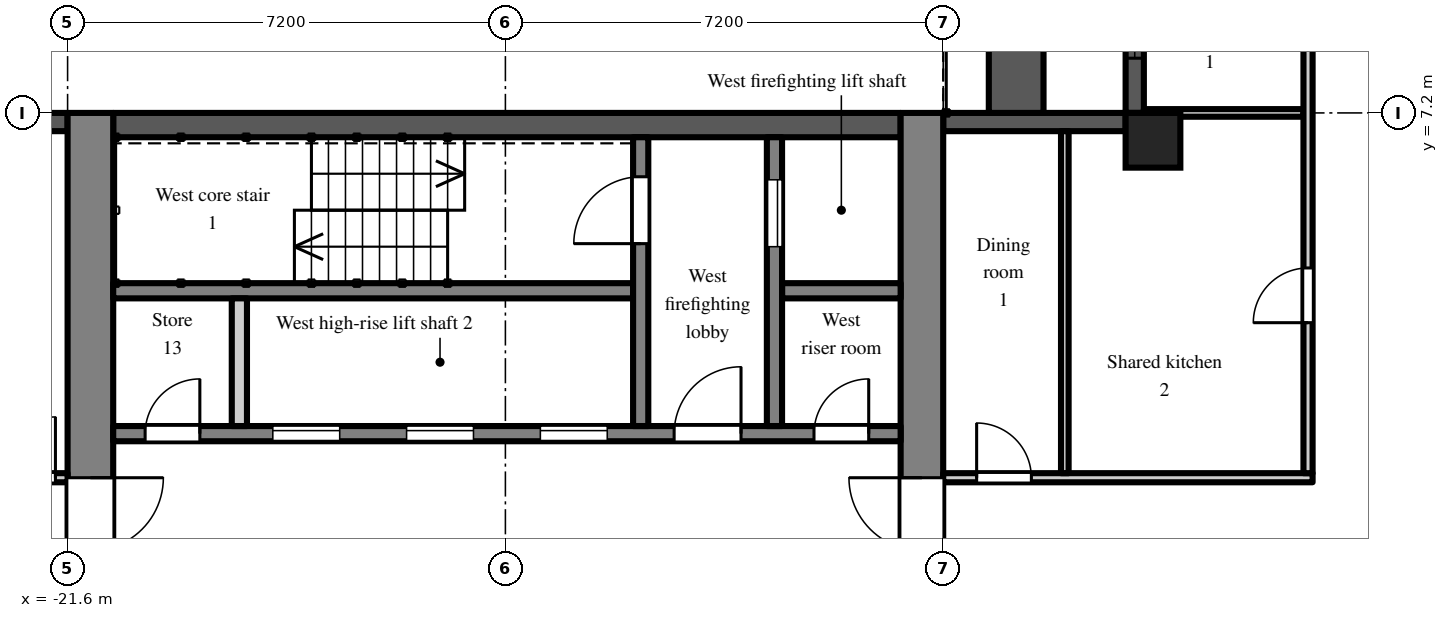
"""IFC4 building model, lengths in metres.
Left out: names, types, materials, properties, quantities, classifications, styles, units other than length and angle.
Written with IfcOpenShell. Run it as: python <this file> out.ifc"""

import sys

from ifc_helpers import new_model, si_unit, direction, frame, frame_2d, origin, origin_2d, place, context, subcontext, project, spatial, rectangle, extrude, element, fill, save


model = new_model("IFC4")
c1 = context("Model", 3, precision=1e-05, world=origin(), true_north=direction((0.0, 1.0)))
c2 = subcontext(c1, "Body", "Model", "MODEL_VIEW")
j1 = project(units=[si_unit("LENGTHUNIT", "METRE"), si_unit("PLANEANGLEUNIT", "RADIAN")], contexts=[c1])
p1 = place(None, origin())
s1 = spatial("IfcSite", under=j1, at=p1, CompositionType="ELEMENT")
p2 = place(p1, origin())
s2 = spatial("IfcBuilding", under=s1, at=p2, CompositionType="ELEMENT")
p3 = place(p2, frame((0.0, 0.0, 216.9)))
s3 = spatial("IfcBuildingStorey", under=s2, at=p3, CompositionType="ELEMENT", Elevation=216.9)
p4 = place(p3, frame((-3.75, 6.75, 0.0), z_axis=(0.0, 0.0, 1.0), x_axis=(1.0, 0.0, 0.0)))
e1 = element("IfcColumn", 1, at=p4, inside=s3, PredefinedType="COLUMN", context=c2, shape_type="SweptSolid", body=[
    extrude(rectangle(XDim=0.9, YDim=0.9, at=origin_2d()), origin(), (0.0, 0.0, 1.0), 3.0),
])
p5 = place(p3, frame((-4.05, 14.4, 0.0), z_axis=(0.0, 0.0, 1.0), x_axis=(0.0, -1.0, 0.0)))
e2 = element("IfcWall", 2, at=p5, inside=s3, PredefinedType="SOLIDWALL", context=c2, shape_type="SweptSolid", body=[
    extrude(rectangle(XDim=7.2, YDim=0.3, at=frame_2d((3.6, 0.0))), origin(), (0.0, 0.0, 1.0), 2.3),
])
p6 = place(p5, frame((3.0, 0.0, 0.0)))
e3 = element("IfcOpeningElement", 3, at=p6, cuts=e2, PredefinedType="OPENING", context=c2, shape_type="SweptSolid", body=[
    extrude(rectangle(XDim=1.2, YDim=2.05, at=frame_2d((0.6, 1.025))), frame((0.0, 0.16, 0.0), z_axis=(0.0, -1.0, 0.0), x_axis=(1.0, 0.0, 0.0)), (0.0, 0.0, 1.0), 0.32),
])
p7 = place(p5, frame((0.9, 0.0, 0.2)))
e4 = element("IfcOpeningElement", 4, at=p7, cuts=e2, PredefinedType="OPENING", context=c2, shape_type="SweptSolid", body=[
    extrude(rectangle(XDim=1.8, YDim=1.85, at=frame_2d((0.9, 0.925))), frame((0.0, 0.16, 0.0), z_axis=(0.0, -1.0, 0.0), x_axis=(1.0, 0.0, 0.0)), (0.0, 0.0, 1.0), 0.32),
])
p8 = place(p5, frame((4.5, 0.0, 0.2)))
e5 = element("IfcOpeningElement", 5, at=p8, cuts=e2, PredefinedType="OPENING", context=c2, shape_type="SweptSolid", body=[
    extrude(rectangle(XDim=1.8, YDim=1.85, at=frame_2d((0.9, 0.925))), frame((0.0, 0.16, 0.0), z_axis=(0.0, -1.0, 0.0), x_axis=(1.0, 0.0, 0.0)), (0.0, 0.0, 1.0), 0.32),
])
p9 = place(p3, frame((-4.2, 7.05, 0.0), z_axis=(0.0, 0.0, 1.0), x_axis=(-1.0, 0.0, 0.0)))
e6 = element("IfcWall", 6, at=p9, inside=s3, PredefinedType="SOLIDWALL", context=c2, shape_type="SweptSolid", body=[
    extrude(rectangle(XDim=3.0, YDim=0.3, at=frame_2d((1.5, 0.0))), origin(), (0.0, 0.0, 1.0), 2.3),
])
p10 = place(p3, frame((-21.6, 7.05, 0.0), z_axis=(0.0, 0.0, 1.0), x_axis=(-1.0, 0.0, 0.0)))
e7 = element("IfcWall", 7, at=p10, inside=s3, PredefinedType="SOLIDWALL", context=c2, shape_type="SweptSolid", body=[
    extrude(rectangle(XDim=2.7, YDim=0.3, at=frame_2d((1.35, 0.0))), origin(), (0.0, 0.0, 1.0), 2.3),
])
p11 = place(p10, frame((0.75, 0.0, 0.2)))
e8 = element("IfcOpeningElement", 8, at=p11, cuts=e7, PredefinedType="OPENING", context=c2, shape_type="SweptSolid", body=[
    extrude(rectangle(XDim=1.2, YDim=1.85, at=frame_2d((0.6, 0.925))), frame((0.0, 0.16, 0.0), z_axis=(0.0, -1.0, 0.0), x_axis=(1.0, 0.0, 0.0)), (0.0, 0.0, 1.0), 0.32),
])
p12 = place(p3, frame((-6.0, 7.2, 0.0), z_axis=(0.0, 0.0, 1.0), x_axis=(0.0, 1.0, 0.0)))
e9 = element("IfcWall", 9, at=p12, inside=s3, PredefinedType="PARAPET", context=c2, shape_type="SweptSolid", body=[
    extrude(rectangle(XDim=7.2, YDim=0.9, at=frame_2d((3.6, 0.0))), origin(), (0.0, 0.0, 1.0), 0.8),
])
p13 = place(p3, frame((-7.55, -7.2, 0.0), z_axis=(0.0, 0.0, 1.0), x_axis=(0.0, 1.0, 0.0)))
e10 = element("IfcWall", 10, at=p13, inside=s3, PredefinedType="SHEAR", context=c2, shape_type="SweptSolid", body=[
    extrude(rectangle(XDim=14.4, YDim=0.7, at=frame_2d((7.2, 0.0))), origin(), (0.0, 0.0, 1.0), 2.6),
])
p14 = place(p13, frame((6.0, 0.0, 0.0)))
e11 = element("IfcOpeningElement", 11, at=p14, cuts=e10, PredefinedType="OPENING", context=c2, shape_type="SweptSolid", body=[
    extrude(rectangle(XDim=2.4, YDim=2.2, at=frame_2d((1.2, 1.1))), frame((0.0, 0.36, 0.0), z_axis=(0.0, -1.0, 0.0), x_axis=(1.0, 0.0, 0.0)), (0.0, 0.0, 1.0), 0.72),
])
p15 = place(p3, frame((-21.225, -7.2, 0.0), z_axis=(0.0, 0.0, 1.0), x_axis=(0.0, 1.0, 0.0)))
e12 = element("IfcWall", 12, at=p15, inside=s3, PredefinedType="SHEAR", context=c2, shape_type="SweptSolid", body=[
    extrude(rectangle(XDim=14.4, YDim=0.75, at=frame_2d((7.2, 0.0))), origin(), (0.0, 0.0, 1.0), 2.6),
])
p16 = place(p15, frame((6.0, 0.0, 0.0)))
e13 = element("IfcOpeningElement", 13, at=p16, cuts=e12, PredefinedType="OPENING", context=c2, shape_type="SweptSolid", body=[
    extrude(rectangle(XDim=2.4, YDim=2.2, at=frame_2d((1.2, 1.1))), frame((0.0, 0.385, 0.0), z_axis=(0.0, -1.0, 0.0), x_axis=(1.0, 0.0, 0.0)), (0.0, 0.0, 1.0), 0.77),
])
p17 = place(p3, frame((-7.9, 7.0, 0.0), z_axis=(0.0, 0.0, 1.0), x_axis=(-1.0, 0.0, 0.0)))
e14 = element("IfcWall", 14, at=p17, inside=s3, PredefinedType="SHEAR", context=c2, shape_type="SweptSolid", body=[
    extrude(rectangle(XDim=12.95, YDim=0.4, at=frame_2d((6.475, 0.0))), origin(), (0.0, 0.0, 1.0), 2.6),
])
p18 = place(p3, frame((-7.9, 1.925, 0.0), z_axis=(0.0, 0.0, 1.0), x_axis=(-1.0, 0.0, 0.0)))
e15 = element("IfcWall", 15, at=p18, inside=s3, PredefinedType="SHEAR", context=c2, shape_type="SweptSolid", body=[
    extrude(rectangle(XDim=12.95, YDim=0.25, at=frame_2d((6.475, 0.0))), origin(), (0.0, 0.0, 1.0), 2.6),
])
p19 = place(p18, frame((4.825, 0.0, 0.0)))
e16 = element("IfcOpeningElement", 16, at=p19, cuts=e15, PredefinedType="OPENING", context=c2, shape_type="SweptSolid", body=[
    extrude(rectangle(XDim=1.1, YDim=2.1, at=frame_2d((0.55, 1.05))), frame((0.0, 0.135, 0.0), z_axis=(0.0, -1.0, 0.0), x_axis=(1.0, 0.0, 0.0)), (0.0, 0.0, 1.0), 0.27),
])
p20 = place(p18, frame((7.025, 0.0, 0.0)))
e17 = element("IfcOpeningElement", 17, at=p20, cuts=e15, PredefinedType="OPENING", context=c2, shape_type="SweptSolid", body=[
    extrude(rectangle(XDim=1.1, YDim=2.1, at=frame_2d((0.55, 1.05))), frame((0.0, 0.135, 0.0), z_axis=(0.0, -1.0, 0.0), x_axis=(1.0, 0.0, 0.0)), (0.0, 0.0, 1.0), 0.27),
])
p21 = place(p18, frame((9.225, 0.0, 0.0)))
e18 = element("IfcOpeningElement", 18, at=p21, cuts=e15, PredefinedType="OPENING", context=c2, shape_type="SweptSolid", body=[
    extrude(rectangle(XDim=1.1, YDim=2.1, at=frame_2d((0.55, 1.05))), frame((0.0, 0.135, 0.0), z_axis=(0.0, -1.0, 0.0), x_axis=(1.0, 0.0, 0.0)), (0.0, 0.0, 1.0), 0.27),
])
p22 = place(p18, frame((0.525, 0.0, 0.0)))
e19 = element("IfcOpeningElement", 19, at=p22, cuts=e15, PredefinedType="OPENING", context=c2, shape_type="SweptSolid", body=[
    extrude(rectangle(XDim=0.9, YDim=2.1, at=frame_2d((0.45, 1.05))), frame((0.0, 0.135, 0.0), z_axis=(0.0, -1.0, 0.0), x_axis=(1.0, 0.0, 0.0)), (0.0, 0.0, 1.0), 0.27),
])
p23 = place(p18, frame((2.625, 0.0, 0.0)))
e20 = element("IfcOpeningElement", 20, at=p23, cuts=e15, PredefinedType="OPENING", context=c2, shape_type="SweptSolid", body=[
    extrude(rectangle(XDim=1.1, YDim=2.1, at=frame_2d((0.55, 1.05))), frame((0.0, 0.135, 0.0), z_axis=(0.0, -1.0, 0.0), x_axis=(1.0, 0.0, 0.0)), (0.0, 0.0, 1.0), 0.27),
])
p24 = place(p18, frame((11.525, 0.0, 0.0)))
e21 = element("IfcOpeningElement", 21, at=p24, cuts=e15, PredefinedType="OPENING", context=c2, shape_type="SweptSolid", body=[
    extrude(rectangle(XDim=0.9, YDim=2.1, at=frame_2d((0.45, 1.05))), frame((0.0, 0.135, 0.0), z_axis=(0.0, -1.0, 0.0), x_axis=(1.0, 0.0, 0.0)), (0.0, 0.0, 1.0), 0.27),
])
p25 = place(p3, frame((-7.9, 4.275, 0.0), z_axis=(0.0, 0.0, 1.0), x_axis=(-1.0, 0.0, 0.0)))
e22 = element("IfcWall", 22, at=p25, inside=s3, PredefinedType="SHEAR", context=c2, shape_type="SweptSolid", body=[
    extrude(rectangle(XDim=1.95, YDim=0.25, at=frame_2d((0.975, 0.0))), origin(), (0.0, 0.0, 1.0), 2.6),
])
p26 = place(p3, frame((-12.3, 4.275, 0.0), z_axis=(0.0, 0.0, 1.0), x_axis=(-1.0, 0.0, 0.0)))
e23 = element("IfcWall", 23, at=p26, inside=s3, PredefinedType="SHEAR", context=c2, shape_type="SweptSolid", body=[
    extrude(rectangle(XDim=8.55, YDim=0.25, at=frame_2d((4.275, 0.0))), origin(), (0.0, 0.0, 1.0), 2.6),
])
p27 = place(p3, frame((-9.975, 2.05, 0.0), z_axis=(0.0, 0.0, 1.0), x_axis=(0.0, 1.0, 0.0)))
e24 = element("IfcWall", 24, at=p27, inside=s3, PredefinedType="SHEAR", context=c2, shape_type="SweptSolid", body=[
    extrude(rectangle(XDim=4.75, YDim=0.25, at=frame_2d((2.375, 0.0))), origin(), (0.0, 0.0, 1.0), 2.6),
])
p28 = place(p27, frame((2.95, 0.0, 0.0)))
e25 = element("IfcOpeningElement", 25, at=p28, cuts=e24, PredefinedType="OPENING", context=c2, shape_type="SweptSolid", body=[
    extrude(rectangle(XDim=1.1, YDim=2.1, at=frame_2d((0.55, 1.05))), frame((0.0, 0.135, 0.0), z_axis=(0.0, -1.0, 0.0), x_axis=(1.0, 0.0, 0.0)), (0.0, 0.0, 1.0), 0.27),
])
p29 = place(p3, frame((-12.175, 2.05, 0.0), z_axis=(0.0, 0.0, 1.0), x_axis=(0.0, 1.0, 0.0)))
e26 = element("IfcWall", 26, at=p29, inside=s3, PredefinedType="SHEAR", context=c2, shape_type="SweptSolid", body=[
    extrude(rectangle(XDim=4.75, YDim=0.25, at=frame_2d((2.375, 0.0))), origin(), (0.0, 0.0, 1.0), 2.6),
])
p30 = place(p29, frame((3.0, 0.0, 0.0)))
e27 = element("IfcOpeningElement", 27, at=p30, cuts=e26, PredefinedType="OPENING", context=c2, shape_type="SweptSolid", body=[
    extrude(rectangle(XDim=1.1, YDim=2.1, at=frame_2d((0.55, 1.05))), frame((0.0, 0.135, 0.0), z_axis=(0.0, -1.0, 0.0), x_axis=(1.0, 0.0, 0.0)), (0.0, 0.0, 1.0), 0.27),
])
p31 = place(p3, frame((-18.775, 2.05, 0.0), z_axis=(0.0, 0.0, 1.0), x_axis=(0.0, 1.0, 0.0)))
e28 = element("IfcWall", 28, at=p31, inside=s3, PredefinedType="PARTITIONING", context=c2, shape_type="SweptSolid", body=[
    extrude(rectangle(XDim=2.1, YDim=0.25, at=frame_2d((1.05, 0.0))), origin(), (0.0, 0.0, 1.0), 2.6),
])
p32 = place(p3, frame((-26.725, 1.2, 0.0), z_axis=(0.0, 0.0, 1.0), x_axis=(1.0, 0.0, 0.0)))
e29 = element("IfcWall", 29, at=p32, inside=s3, PredefinedType="PARTITIONING", context=c2, shape_type="SweptSolid", body=[
    extrude(rectangle(XDim=5.125, YDim=0.15, at=frame_2d((2.562, 0.0))), origin(), (0.0, 0.0, 1.0), 2.6),
])
p33 = place(p32, frame((3.925, 0.0, 0.0)))
e30 = element("IfcOpeningElement", 30, at=p33, cuts=e29, PredefinedType="OPENING", context=c2, shape_type="SweptSolid", body=[
    extrude(rectangle(XDim=1.0, YDim=2.1, at=frame_2d((0.5, 1.05))), frame((0.0, 0.085, 0.0), z_axis=(0.0, -1.0, 0.0), x_axis=(1.0, 0.0, 0.0)), (0.0, 0.0, 1.0), 0.17),
])
p34 = place(p3, frame((-7.2, 1.2, 0.0), z_axis=(0.0, 0.0, 1.0), x_axis=(1.0, 0.0, 0.0)))
e31 = element("IfcWall", 31, at=p34, inside=s3, PredefinedType="PARTITIONING", context=c2, shape_type="SweptSolid", body=[
    extrude(rectangle(XDim=6.075, YDim=0.15, at=frame_2d((3.038, 0.0))), origin(), (0.0, 0.0, 1.0), 2.6),
])
p35 = place(p34, frame((0.55, 0.0, 0.0)))
e32 = element("IfcOpeningElement", 32, at=p35, cuts=e31, PredefinedType="OPENING", context=c2, shape_type="SweptSolid", body=[
    extrude(rectangle(XDim=0.9, YDim=2.1, at=frame_2d((0.45, 1.05))), frame((0.0, 0.085, 0.0), z_axis=(0.0, -1.0, 0.0), x_axis=(1.0, 0.0, 0.0)), (0.0, 0.0, 1.0), 0.17),
])
p36 = place(p3, frame((-5.2, 1.275, 0.0), z_axis=(0.0, 0.0, 1.0), x_axis=(0.0, 1.0, 0.0)))
e33 = element("IfcWall", 33, at=p36, inside=s3, PredefinedType="PARTITIONING", context=c2, shape_type="SweptSolid", body=[
    extrude(rectangle(XDim=5.625, YDim=0.125, at=frame_2d((2.812, 0.0))), origin(), (0.0, 0.0, 1.0), 2.6),
])
p37 = place(p3, frame((-3.9, 7.2, 0.0), z_axis=(0.0, 0.0, 1.0), x_axis=(1.0, 0.0, 0.0)))
e34 = element("IfcWall", 34, at=p37, inside=s3, PredefinedType="PARTITIONING", context=c2, shape_type="SweptSolid", body=[
    extrude(rectangle(XDim=2.625, YDim=0.125, at=frame_2d((1.312, 0.0))), origin(), (0.0, 0.0, 1.0), 2.6),
])
p38 = place(p3, frame((-1.2, 1.275, 0.0), z_axis=(0.0, 0.0, 1.0), x_axis=(0.0, 1.0, 0.0)))
e35 = element("IfcWall", 35, at=p38, inside=s3, PredefinedType="PARTITIONING", context=c2, shape_type="SweptSolid", body=[
    extrude(rectangle(XDim=18.25, YDim=0.15, at=frame_2d((9.125, 0.0))), origin(), (0.0, 0.0, 1.0), 2.6),
])
p39 = place(p38, frame((2.475, 0.0, 0.0)))
e36 = element("IfcOpeningElement", 36, at=p39, cuts=e35, PredefinedType="OPENING", context=c2, shape_type="SweptSolid", body=[
    extrude(rectangle(XDim=0.9, YDim=2.1, at=frame_2d((0.45, 1.05))), frame((0.0, 0.085, 0.0), z_axis=(0.0, -1.0, 0.0), x_axis=(1.0, 0.0, 0.0)), (0.0, 0.0, 1.0), 0.17),
])
p40 = place(p38, frame((10.875, 0.0, 0.0)))
e37 = element("IfcOpeningElement", 37, at=p40, cuts=e35, PredefinedType="OPENING", context=c2, shape_type="SweptSolid", body=[
    extrude(rectangle(XDim=0.9, YDim=2.1, at=frame_2d((0.45, 1.05))), frame((0.0, 0.085, 0.0), z_axis=(0.0, -1.0, 0.0), x_axis=(1.0, 0.0, 0.0)), (0.0, 0.0, 1.0), 0.17),
])
p41 = place(p38, frame((14.475, 0.0, 0.0)))
e38 = element("IfcOpeningElement", 38, at=p41, cuts=e35, PredefinedType="OPENING", context=c2, shape_type="SweptSolid", body=[
    extrude(rectangle(XDim=0.9, YDim=2.1, at=frame_2d((0.45, 1.05))), frame((0.0, 0.085, 0.0), z_axis=(0.0, -1.0, 0.0), x_axis=(1.0, 0.0, 0.0)), (0.0, 0.0, 1.0), 0.17),
])
p42 = place(p38, frame((17.075, 0.0, 0.0)))
e39 = element("IfcOpeningElement", 39, at=p42, cuts=e35, PredefinedType="OPENING", context=c2, shape_type="SweptSolid", body=[
    extrude(rectangle(XDim=0.9, YDim=2.1, at=frame_2d((0.45, 1.05))), frame((0.0, 0.085, 0.0), z_axis=(0.0, -1.0, 0.0), x_axis=(1.0, 0.0, 0.0)), (0.0, 0.0, 1.0), 0.17),
])
p43 = place(p8, origin())
e40 = element("IfcWindow", 40, at=p43, inside=s3, PartitioningType="SINGLE_PANEL", PredefinedType="WINDOW", context=c2, shape_type="SweptSolid", body=[
    extrude(rectangle(XDim=1.8, YDim=1.85, at=frame_2d((0.9, 0.925))), frame((0.0, 0.03, 0.0), z_axis=(0.0, -1.0, 0.0), x_axis=(1.0, 0.0, 0.0)), (0.0, 0.0, 1.0), 0.06),
])
fill(e5, e40)
p44 = place(p19, origin())
e41 = element("IfcDoor", 41, at=p44, inside=s3, OperationType="SLIDING_TO_LEFT", PredefinedType="DOOR", context=c2, shape_type="SweptSolid", body=[
    extrude(rectangle(XDim=1.1, YDim=2.1, at=frame_2d((0.55, 1.05))), frame((0.0, 0.025, 0.0), z_axis=(0.0, -1.0, 0.0), x_axis=(1.0, 0.0, 0.0)), (0.0, 0.0, 1.0), 0.05),
])
fill(e16, e41)
p45 = place(p20, origin())
e42 = element("IfcDoor", 42, at=p45, inside=s3, OperationType="SLIDING_TO_LEFT", PredefinedType="DOOR", context=c2, shape_type="SweptSolid", body=[
    extrude(rectangle(XDim=1.1, YDim=2.1, at=frame_2d((0.55, 1.05))), frame((0.0, 0.025, 0.0), z_axis=(0.0, -1.0, 0.0), x_axis=(1.0, 0.0, 0.0)), (0.0, 0.0, 1.0), 0.05),
])
fill(e17, e42)
p46 = place(p21, origin())
e43 = element("IfcDoor", 43, at=p46, inside=s3, OperationType="SLIDING_TO_LEFT", PredefinedType="DOOR", context=c2, shape_type="SweptSolid", body=[
    extrude(rectangle(XDim=1.1, YDim=2.1, at=frame_2d((0.55, 1.05))), frame((0.0, 0.025, 0.0), z_axis=(0.0, -1.0, 0.0), x_axis=(1.0, 0.0, 0.0)), (0.0, 0.0, 1.0), 0.05),
])
fill(e18, e43)
p47 = place(p28, origin())
e44 = element("IfcDoor", 44, at=p47, inside=s3, OperationType="SLIDING_TO_LEFT", PredefinedType="DOOR", context=c2, shape_type="SweptSolid", body=[
    extrude(rectangle(XDim=1.1, YDim=2.1, at=frame_2d((0.55, 1.05))), frame((0.0, 0.025, 0.0), z_axis=(0.0, -1.0, 0.0), x_axis=(1.0, 0.0, 0.0)), (0.0, 0.0, 1.0), 0.05),
])
fill(e25, e44)
p48 = place(p30, origin())
e45 = element("IfcDoor", 45, at=p48, inside=s3, OperationType="SINGLE_SWING_LEFT", PredefinedType="DOOR", context=c2, shape_type="SweptSolid", body=[
    extrude(rectangle(XDim=1.1, YDim=2.1, at=frame_2d((0.55, 1.05))), frame((0.0, 0.025, 0.0), z_axis=(0.0, -1.0, 0.0), x_axis=(1.0, 0.0, 0.0)), (0.0, 0.0, 1.0), 0.05),
])
fill(e27, e45)
p49 = place(p22, frame((0.9, 0.0, 0.0), z_axis=(0.0, 0.0, 1.0), x_axis=(-1.0, 0.0, 0.0)))
e46 = element("IfcDoor", 46, at=p49, inside=s3, OperationType="SINGLE_SWING_RIGHT", PredefinedType="DOOR", context=c2, shape_type="SweptSolid", body=[
    extrude(rectangle(XDim=0.9, YDim=2.1, at=frame_2d((0.45, 1.05))), frame((0.0, 0.025, 0.0), z_axis=(0.0, -1.0, 0.0), x_axis=(1.0, 0.0, 0.0)), (0.0, 0.0, 1.0), 0.05),
])
fill(e19, e46)
p50 = place(p23, frame((1.1, 0.0, 0.0), z_axis=(0.0, 0.0, 1.0), x_axis=(-1.0, 0.0, 0.0)))
e47 = element("IfcDoor", 47, at=p50, inside=s3, OperationType="SINGLE_SWING_RIGHT", PredefinedType="DOOR", context=c2, shape_type="SweptSolid", body=[
    extrude(rectangle(XDim=1.1, YDim=2.1, at=frame_2d((0.55, 1.05))), frame((0.0, 0.025, 0.0), z_axis=(0.0, -1.0, 0.0), x_axis=(1.0, 0.0, 0.0)), (0.0, 0.0, 1.0), 0.05),
])
fill(e20, e47)
p51 = place(p14, origin())
e48 = element("IfcDoor", 48, at=p51, inside=s3, OperationType="DOUBLE_DOOR_DOUBLE_SWING", PredefinedType="DOOR", context=c2, shape_type="SweptSolid", body=[
    extrude(rectangle(XDim=2.4, YDim=2.2, at=frame_2d((1.2, 1.1))), frame((0.0, 0.025, 0.0), z_axis=(0.0, -1.0, 0.0), x_axis=(1.0, 0.0, 0.0)), (0.0, 0.0, 1.0), 0.05),
])
fill(e11, e48)
p52 = place(p16, frame((2.4, 0.0, 0.0), z_axis=(0.0, 0.0, 1.0), x_axis=(-1.0, 0.0, 0.0)))
e49 = element("IfcDoor", 49, at=p52, inside=s3, OperationType="DOUBLE_DOOR_DOUBLE_SWING", PredefinedType="DOOR", context=c2, shape_type="SweptSolid", body=[
    extrude(rectangle(XDim=2.4, YDim=2.2, at=frame_2d((1.2, 1.1))), frame((0.0, 0.025, 0.0), z_axis=(0.0, -1.0, 0.0), x_axis=(1.0, 0.0, 0.0)), (0.0, 0.0, 1.0), 0.05),
])
fill(e13, e49)
p53 = place(p24, frame((0.9, 0.0, 0.0), z_axis=(0.0, 0.0, 1.0), x_axis=(-1.0, 0.0, 0.0)))
e50 = element("IfcDoor", 50, at=p53, inside=s3, OperationType="SINGLE_SWING_RIGHT", PredefinedType="DOOR", context=c2, shape_type="SweptSolid", body=[
    extrude(rectangle(XDim=0.9, YDim=2.1, at=frame_2d((0.45, 1.05))), frame((0.0, 0.025, 0.0), z_axis=(0.0, -1.0, 0.0), x_axis=(1.0, 0.0, 0.0)), (0.0, 0.0, 1.0), 0.05),
])
fill(e21, e50)
p54 = place(p39, origin())
e51 = element("IfcDoor", 51, at=p54, inside=s3, OperationType="SINGLE_SWING_LEFT", PredefinedType="DOOR", context=c2, shape_type="SweptSolid", body=[
    extrude(rectangle(XDim=0.9, YDim=2.1, at=frame_2d((0.45, 1.05))), frame((0.0, 0.025, 0.0), z_axis=(0.0, -1.0, 0.0), x_axis=(1.0, 0.0, 0.0)), (0.0, 0.0, 1.0), 0.05),
])
fill(e36, e51)
p55 = place(p35, origin())
e52 = element("IfcDoor", 52, at=p55, inside=s3, OperationType="SINGLE_SWING_LEFT", PredefinedType="DOOR", context=c2, shape_type="SweptSolid", body=[
    extrude(rectangle(XDim=0.9, YDim=2.1, at=frame_2d((0.45, 1.05))), frame((0.0, 0.025, 0.0), z_axis=(0.0, -1.0, 0.0), x_axis=(1.0, 0.0, 0.0)), (0.0, 0.0, 1.0), 0.05),
])
fill(e32, e52)
p56 = place(p33, origin())
e53 = element("IfcDoor", 53, at=p56, inside=s3, OperationType="SINGLE_SWING_RIGHT", PredefinedType="DOOR", context=c2, shape_type="SweptSolid", body=[
    extrude(rectangle(XDim=1.0, YDim=2.1, at=frame_2d((0.5, 1.05))), frame((0.0, 0.025, 0.0), z_axis=(0.0, -1.0, 0.0), x_axis=(1.0, 0.0, 0.0)), (0.0, 0.0, 1.0), 0.05),
])
fill(e30, e53)
save(model, sys.argv[1])
